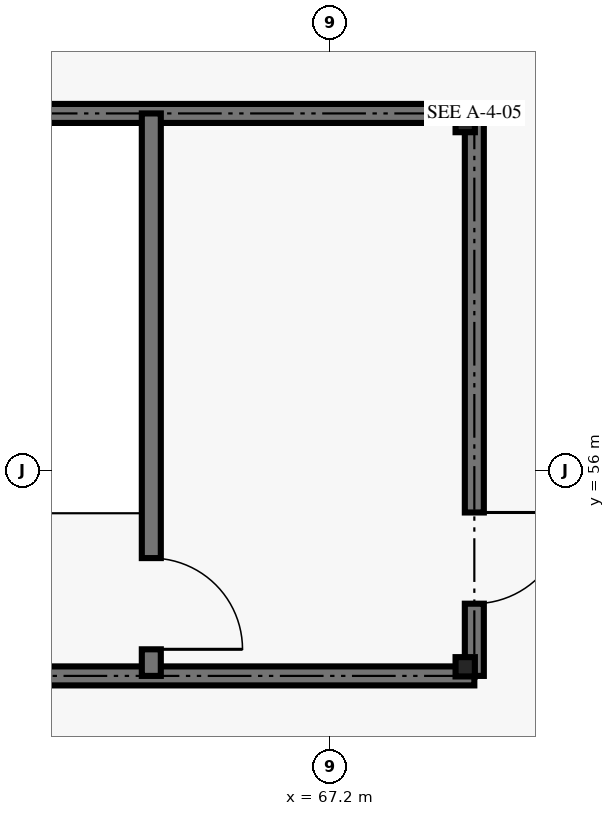
"""IFC4 building model, lengths in metres.
Left out: names, types, materials, properties, quantities, classifications, styles, units other than length and angle.
Written with IfcOpenShell. Run it as: python <this file> out.ifc"""

import sys

from ifc_helpers import new_model, si_unit, direction, frame, frame_2d, origin, origin_2d, place, context, subcontext, project, spatial, rectangle, i_section, extrude, element, fill, save


model = new_model("IFC4")
c1 = context("Model", 3, precision=1e-05, world=origin(), true_north=direction((0.0, 1.0)))
c2 = subcontext(c1, "Body", "Model", "MODEL_VIEW")
j1 = project(units=[si_unit("LENGTHUNIT", "METRE"), si_unit("PLANEANGLEUNIT", "RADIAN")], contexts=[c1])
p1 = place(None, origin())
s1 = spatial("IfcSite", under=j1, at=p1, CompositionType="ELEMENT")
p2 = place(p1, origin())
s2 = spatial("IfcBuilding", under=s1, at=p2, CompositionType="ELEMENT")
p3 = place(p2, frame((0.0, 0.0, 15.0)))
s3 = spatial("IfcBuildingStorey", under=s2, at=p3, CompositionType="ELEMENT", Elevation=15.0)
for number, where, z_axis, x_axis in (
    (1, (68.98, 53.42, 0.0), (0.0, 0.0, 1.0), (1.0, 0.0, 0.0)),
    (2, (68.98, 60.58, 0.0), (0.0, 0.0, 1.0), (1.0, 0.0, 0.0)),
):
    element("IfcColumn", number, at=place(p3, frame(where, z_axis=z_axis, x_axis=x_axis)), inside=s3, PredefinedType="COLUMN", context=c2, shape_type="SweptSolid", body=[
        extrude(i_section(OverallWidth=0.254, OverallDepth=0.254, WebThickness=0.009, FlangeThickness=0.014, FilletRadius=0.013, at=origin_2d()), origin(), (0.0, 0.0, 1.0), 4.8),
    ])
for number, where, z_axis, x_axis in (
    (3, (59.9, 60.7, 0.0), (0.0, 0.0, 1.0), (1.0, 0.0, 0.0)),
    (4, (69.1, 53.3, 0.0), (0.0, 0.0, 1.0), (-1.0, 0.0, 0.0)),
):
    element("IfcWall", number, at=place(p3, frame(where, z_axis=z_axis, x_axis=x_axis)), inside=s3, PredefinedType="SHEAR", context=c2, shape_type="SweptSolid", body=[
        extrude(rectangle(XDim=9.2, YDim=0.25, at=frame_2d((4.6, 0.0))), origin(), (0.0, 0.0, 1.0), 4.56),
    ])
p4 = place(p3, frame((69.1, 60.7, 0.0), z_axis=(0.0, 0.0, 1.0), x_axis=(0.0, -1.0, 0.0)))
e5 = element("IfcWall", 5, at=p4, inside=s3, PredefinedType="SHEAR", context=c2, shape_type="SweptSolid", body=[
    extrude(rectangle(XDim=7.4, YDim=0.25, at=frame_2d((3.7, 0.0))), origin(), (0.0, 0.0, 1.0), 4.56),
])
p5 = place(p4, frame((5.25, 0.0, 0.0)))
e6 = element("IfcOpeningElement", 6, at=p5, cuts=e5, PredefinedType="OPENING", context=c2, shape_type="SweptSolid", body=[
    extrude(rectangle(XDim=1.2, YDim=2.2, at=frame_2d((0.6, 1.1))), frame((0.0, 0.135, 0.0), z_axis=(0.0, -1.0, 0.0), x_axis=(1.0, 0.0, 0.0)), (0.0, 0.0, 1.0), 0.27),
])
p6 = place(p3, frame((64.85, 60.7, 0.0), z_axis=(0.0, 0.0, 1.0), x_axis=(0.0, -1.0, 0.0)))
e7 = element("IfcWall", 7, at=p6, inside=s3, PredefinedType="SHEAR", context=c2, shape_type="SweptSolid", body=[
    extrude(rectangle(XDim=7.4, YDim=0.25, at=frame_2d((3.7, 0.0))), origin(), (0.0, 0.0, 1.0), 4.56),
])
p7 = place(p6, frame((5.85, 0.0, 0.0)))
e8 = element("IfcOpeningElement", 8, at=p7, cuts=e7, PredefinedType="OPENING", context=c2, shape_type="SweptSolid", body=[
    extrude(rectangle(XDim=1.2, YDim=2.2, at=frame_2d((0.6, 1.1))), frame((0.0, 0.135, 0.0), z_axis=(0.0, -1.0, 0.0), x_axis=(1.0, 0.0, 0.0)), (0.0, 0.0, 1.0), 0.27),
])
p8 = place(p5, origin())
e9 = element("IfcDoor", 9, at=p8, inside=s3, OperationType="SINGLE_SWING_LEFT", PredefinedType="DOOR", context=c2, shape_type="SweptSolid", body=[
    extrude(rectangle(XDim=1.2, YDim=2.2, at=frame_2d((0.6, 1.1))), frame((0.0, 0.025, 0.0), z_axis=(0.0, -1.0, 0.0), x_axis=(1.0, 0.0, 0.0)), (0.0, 0.0, 1.0), 0.05),
])
fill(e6, e9)
p9 = place(p7, origin())
e10 = element("IfcDoor", 10, at=p9, inside=s3, OperationType="SINGLE_SWING_RIGHT", PredefinedType="DOOR", context=c2, shape_type="SweptSolid", body=[
    extrude(rectangle(XDim=1.2, YDim=2.2, at=frame_2d((0.6, 1.1))), frame((0.0, 0.025, 0.0), z_axis=(0.0, -1.0, 0.0), x_axis=(1.0, 0.0, 0.0)), (0.0, 0.0, 1.0), 0.05),
])
fill(e8, e10)
save(model, sys.argv[1])
